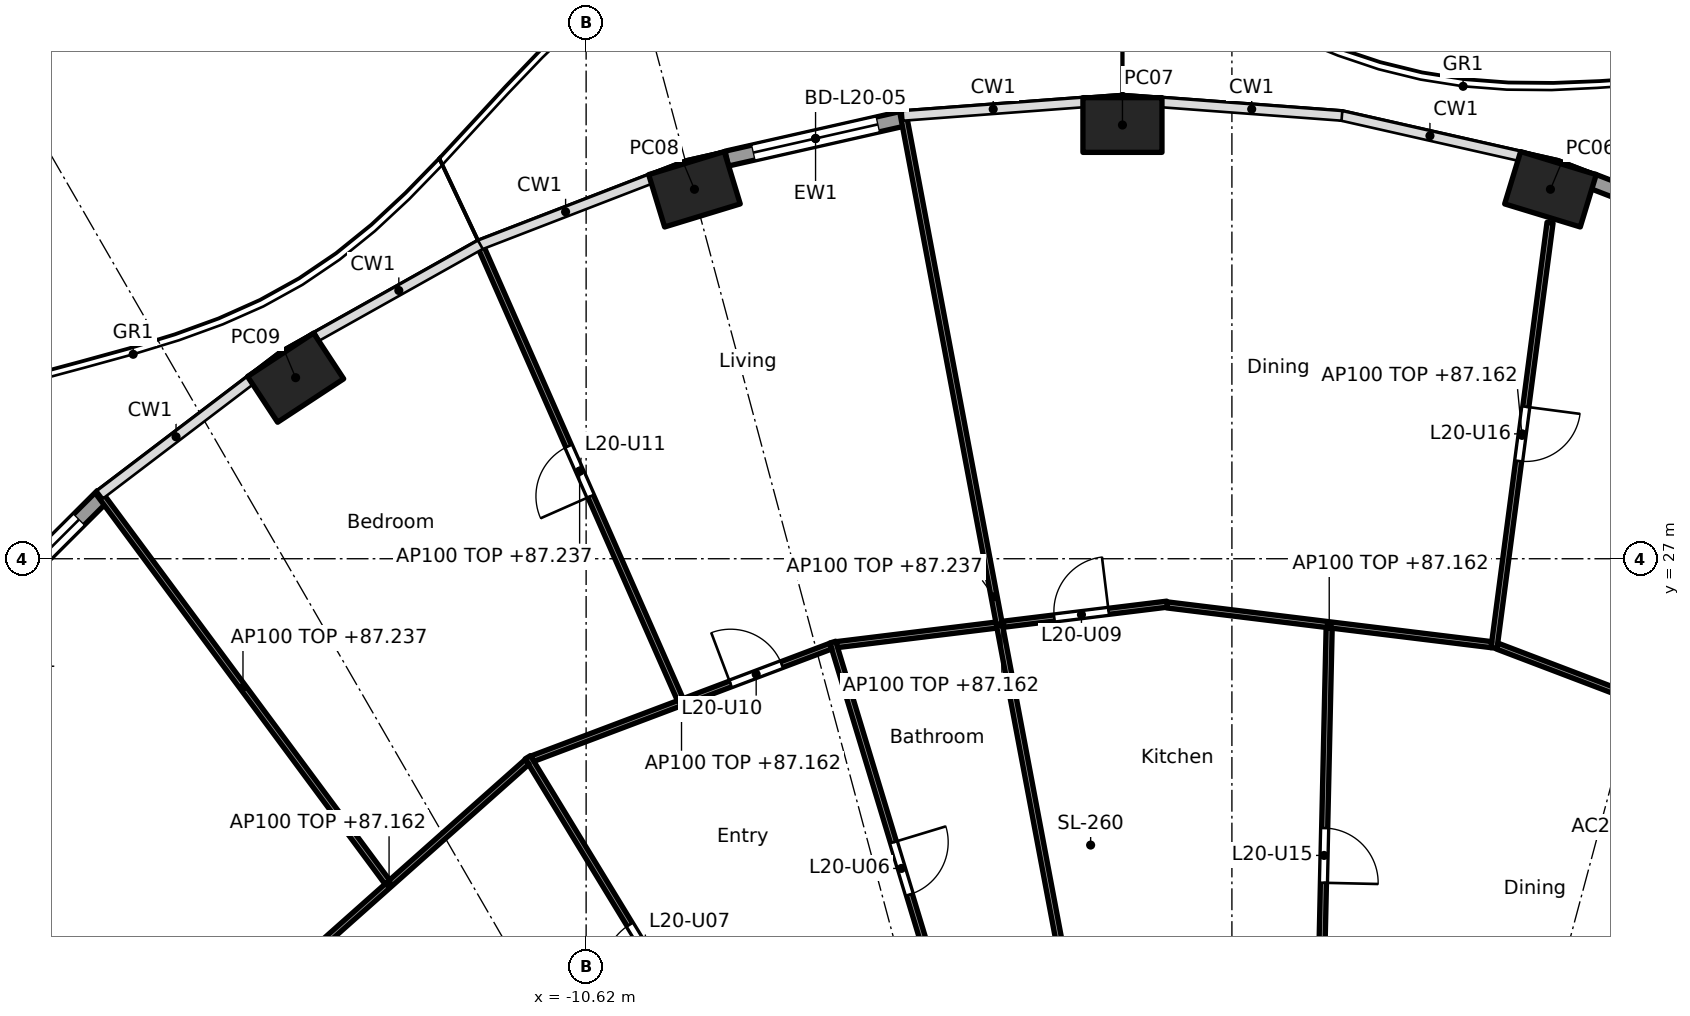
"""IFC4 building model, lengths in metres.
Left out: names, types, materials, properties, quantities, classifications, styles, units other than length and angle.
Written with IfcOpenShell. Run it as: python <this file> out.ifc"""

import sys

from ifc_helpers import new_model, si_unit, direction, frame, frame_2d, origin, origin_2d, place, context, subcontext, project, spatial, rectangle, hollow_rectangle, extrude, element, fill, save


model = new_model("IFC4")
c1 = context("Model", 3, precision=1e-05, world=origin(), true_north=direction((0.0, 1.0)))
c2 = subcontext(c1, "Body", "Model", "MODEL_VIEW")
j1 = project(units=[si_unit("LENGTHUNIT", "METRE"), si_unit("PLANEANGLEUNIT", "RADIAN")], contexts=[c1])
p1 = place(None, origin())
s1 = spatial("IfcSite", under=j1, at=p1, CompositionType="ELEMENT")
p2 = place(p1, origin())
s2 = spatial("IfcBuilding", under=s1, at=p2, CompositionType="ELEMENT")
p3 = place(p2, frame((0.0, 0.0, 84.4)))
s3 = spatial("IfcBuildingStorey", under=s2, at=p3, CompositionType="ELEMENT", Elevation=84.4)
for number, where, z_axis, x_axis in (
    (1, (5.239, 33.076, 0.0), (0.0, 0.0, 1.0), (-0.957, 0.292, 0.0)),
    (2, (-1.8, 34.133, 0.0), (0.0, 0.0, 1.0), (-1.0, 0.0, 0.0)),
    (3, (-8.839, 33.076, 0.0), (0.0, 0.0, 1.0), (-0.957, -0.292, 0.0)),
    (4, (-15.397, 29.978, 0.0), (0.0, 0.0, 1.0), (-0.836, -0.549, 0.0)),
):
    element("IfcColumn", number, at=place(p3, frame(where, z_axis=z_axis, x_axis=x_axis)), inside=s3, PredefinedType="COLUMN", context=c2, shape_type="SweptSolid", body=[
        extrude(hollow_rectangle(XDim=1.3, YDim=0.9, WallThickness=0.045, at=origin_2d()), origin(), (0.0, 0.0, 1.0), 3.7),
    ])
p4 = place(p3, frame((5.929, 33.208, 0.0), z_axis=(0.0, 0.0, 1.0), x_axis=(0.932837560624, -0.360297218263, 0.0)))
e5 = element("IfcWall", 5, at=p4, inside=s3, PredefinedType="SOLIDWALL", context=c2, shape_type="SweptSolid", body=[
    extrude(rectangle(XDim=3.028, YDim=0.25, at=frame_2d((1.514, 0.0))), origin(), (0.0, 0.0, 1.0), 3.44),
])
p5 = place(p4, frame((0.464, 0.0, 0.0)))
e6 = element("IfcOpeningElement", 6, at=p5, cuts=e5, PredefinedType="OPENING", context=c2, shape_type="SweptSolid", body=[
    extrude(rectangle(XDim=2.1, YDim=2.4, at=frame_2d((1.05, 1.2))), frame((0.0, 0.135, 0.0), z_axis=(0.0, -1.0, 0.0), x_axis=(1.0, 0.0, 0.0)), (0.0, 0.0, 1.0), 0.27),
])
p6 = place(p3, frame((-8.306, 33.58, 0.0), z_axis=(0.0, 0.0, 1.0), x_axis=(0.975317607872, 0.220806620767, 0.0)))
e7 = element("IfcWall", 7, at=p6, inside=s3, PredefinedType="SOLIDWALL", context=c2, shape_type="SweptSolid", body=[
    extrude(rectangle(XDim=2.993, YDim=0.25, at=frame_2d((1.497, 0.0))), origin(), (0.0, 0.0, 1.0), 3.44),
])
p7 = place(p6, frame((0.447, 0.0, 0.0)))
e8 = element("IfcOpeningElement", 8, at=p7, cuts=e7, PredefinedType="OPENING", context=c2, shape_type="SweptSolid", body=[
    extrude(rectangle(XDim=2.1, YDim=2.4, at=frame_2d((1.05, 1.2))), frame((0.0, 0.135, 0.0), z_axis=(0.0, -1.0, 0.0), x_axis=(1.0, 0.0, 0.0)), (0.0, 0.0, 1.0), 0.27),
])
p8 = place(p3, frame((-20.835, 25.773, 0.0), z_axis=(0.0, 0.0, 1.0), x_axis=(0.707831646613, 0.706381171927, 0.0)))
e9 = element("IfcWall", 9, at=p8, inside=s3, PredefinedType="SOLIDWALL", context=c2, shape_type="SweptSolid", body=[
    extrude(rectangle(XDim=3.198, YDim=0.25, at=frame_2d((1.599, 0.0))), origin(), (0.0, 0.0, 1.0), 3.44),
])
p9 = place(p8, frame((0.549, 0.0, 0.0)))
e10 = element("IfcOpeningElement", 10, at=p9, cuts=e9, PredefinedType="OPENING", context=c2, shape_type="SweptSolid", body=[
    extrude(rectangle(XDim=2.1, YDim=2.4, at=frame_2d((1.05, 1.2))), frame((0.0, 0.135, 0.0), z_axis=(0.0, -1.0, 0.0), x_axis=(1.0, 0.0, 0.0)), (0.0, 0.0, 1.0), 0.27),
])
p10 = place(p3, frame((6.141, 14.829, 0.0), z_axis=(0.0, 0.0, 1.0), x_axis=(0.354477134193, 0.935064682968, 0.0)))
e11 = element("IfcWall", 11, at=p10, inside=s3, PredefinedType="PARTITIONING", context=c2, shape_type="SweptSolid", body=[
    extrude(rectangle(XDim=15.626, YDim=0.2, at=frame_2d((7.813, 0.0))), origin(), (0.0, 0.0, 1.0), 2.762),
])
p11 = place(p3, frame((9.379, 23.655, 0.0), z_axis=(0.0, 0.0, 1.0), x_axis=(-0.934613076136, 0.355666132653, 0.0)))
e12 = element("IfcWall", 12, at=p11, inside=s3, PredefinedType="PARTITIONING", context=c2, shape_type="SweptSolid", body=[
    extrude(rectangle(XDim=5.366, YDim=0.1, at=frame_2d((2.683, 0.0))), origin(), (0.0, 0.0, 1.0), 2.762),
])
p12 = place(p3, frame((4.311, 25.531, 0.0), z_axis=(0.0, 0.0, 1.0), x_axis=(0.130604008227, 0.991434613595, 0.0)))
e13 = element("IfcWall", 13, at=p12, inside=s3, PredefinedType="PARTITIONING", context=c2, shape_type="SweptSolid", body=[
    extrude(rectangle(XDim=7.055, YDim=0.1, at=frame_2d((3.527, 0.0))), origin(), (0.0, 0.0, 1.0), 2.762),
])
p13 = place(p12, frame((3.102, 0.0, 0.0)))
e14 = element("IfcOpeningElement", 14, at=p13, cuts=e13, PredefinedType="OPENING", context=c2, shape_type="SweptSolid", body=[
    extrude(rectangle(XDim=0.9, YDim=2.1, at=frame_2d((0.45, 1.05))), frame((0.0, 0.06, 0.0), z_axis=(0.0, -1.0, 0.0), x_axis=(1.0, 0.0, 0.0)), (0.0, 0.0, 1.0), 0.12),
])
p14 = place(p3, frame((4.267, 25.587, 0.0), z_axis=(0.0, 0.0, 1.0), x_axis=(-0.992576206119, 0.121624319302, 0.0)))
e15 = element("IfcWall", 15, at=p14, inside=s3, PredefinedType="PARTITIONING", context=c2, shape_type="SweptSolid", body=[
    extrude(rectangle(XDim=5.374, YDim=0.1, at=frame_2d((2.687, 0.0))), origin(), (0.0, 0.0, 1.0), 2.762),
])
p15 = place(p3, frame((1.303, 12.665, 0.0), z_axis=(0.0, 0.0, 1.0), x_axis=(0.022412244057, 0.999748814111, 0.0)))
e16 = element("IfcWall", 16, at=p15, inside=s3, PredefinedType="PARTITIONING", context=c2, shape_type="SweptSolid", body=[
    extrude(rectangle(XDim=13.203, YDim=0.1, at=frame_2d((6.601, 0.0))), origin(), (0.0, 0.0, 1.0), 2.687),
])
p16 = place(p15, frame((2.407, 0.0, 0.0)))
e17 = element("IfcOpeningElement", 17, at=p16, cuts=e16, PredefinedType="OPENING", context=c2, shape_type="SweptSolid", body=[
    extrude(rectangle(XDim=0.9, YDim=2.1, at=frame_2d((0.45, 1.05))), frame((0.0, 0.06, 0.0), z_axis=(0.0, -1.0, 0.0), x_axis=(1.0, 0.0, 0.0)), (0.0, 0.0, 1.0), 0.12),
])
p17 = place(p15, frame((9.009, 0.0, 0.0)))
e18 = element("IfcOpeningElement", 18, at=p17, cuts=e16, PredefinedType="OPENING", context=c2, shape_type="SweptSolid", body=[
    extrude(rectangle(XDim=0.9, YDim=2.1, at=frame_2d((0.45, 1.05))), frame((0.0, 0.06, 0.0), z_axis=(0.0, -1.0, 0.0), x_axis=(1.0, 0.0, 0.0)), (0.0, 0.0, 1.0), 0.12),
])
p18 = place(p3, frame((-1.066, 26.253, 0.0), z_axis=(0.0, 0.0, 1.0), x_axis=(-0.992574853421, -0.121635358166, 0.0)))
e19 = element("IfcWall", 19, at=p18, inside=s3, PredefinedType="PARTITIONING", context=c2, shape_type="SweptSolid", body=[
    extrude(rectangle(XDim=5.473, YDim=0.1, at=frame_2d((2.737, 0.0))), origin(), (0.0, 0.0, 1.0), 2.762),
])
p19 = place(p18, frame((0.969, 0.0, 0.0)))
e20 = element("IfcOpeningElement", 20, at=p19, cuts=e19, PredefinedType="OPENING", context=c2, shape_type="SweptSolid", body=[
    extrude(rectangle(XDim=0.9, YDim=2.1, at=frame_2d((0.45, 1.05))), frame((0.0, 0.06, 0.0), z_axis=(0.0, -1.0, 0.0), x_axis=(1.0, 0.0, 0.0)), (0.0, 0.0, 1.0), 0.12),
])
p20 = place(p3, frame((-2.413, 18.427, 0.0), z_axis=(0.0, 0.0, 1.0), x_axis=(-0.185126823719, 0.982714637695, 0.0)))
e21 = element("IfcWall", 21, at=p20, inside=s3, PredefinedType="PARTITIONING", context=c2, shape_type="SweptSolid", body=[
    extrude(rectangle(XDim=16.176, YDim=0.1, at=frame_2d((8.088, 0.0))), origin(), (0.0, 0.0, 1.0), 2.837),
])
p21 = place(p3, frame((-2.631, 12.66, 0.0), z_axis=(0.0, 0.0, 1.0), x_axis=(-0.290161396499, 0.956977723869, 0.0)))
e22 = element("IfcWall", 22, at=p21, inside=s3, PredefinedType="PARTITIONING", context=c2, shape_type="SweptSolid", body=[
    extrude(rectangle(XDim=13.552, YDim=0.1, at=frame_2d((6.776, 0.0))), origin(), (0.0, 0.0, 1.0), 2.687),
])
p22 = place(p21, frame((0.772, 0.0, 0.0)))
e23 = element("IfcOpeningElement", 23, at=p22, cuts=e22, PredefinedType="OPENING", context=c2, shape_type="SweptSolid", body=[
    extrude(rectangle(XDim=0.9, YDim=2.1, at=frame_2d((0.45, 1.05))), frame((0.0, 0.06, 0.0), z_axis=(0.0, -1.0, 0.0), x_axis=(1.0, 0.0, 0.0)), (0.0, 0.0, 1.0), 0.12),
])
p23 = place(p21, frame((9.212, 0.0, 0.0)))
e24 = element("IfcOpeningElement", 24, at=p23, cuts=e22, PredefinedType="OPENING", context=c2, shape_type="SweptSolid", body=[
    extrude(rectangle(XDim=0.9, YDim=2.1, at=frame_2d((0.45, 1.05))), frame((0.0, 0.06, 0.0), z_axis=(0.0, -1.0, 0.0), x_axis=(1.0, 0.0, 0.0)), (0.0, 0.0, 1.0), 0.12),
])
p24 = place(p3, frame((-6.596, 25.563, 0.0), z_axis=(0.0, 0.0, 1.0), x_axis=(-0.9356162121, -0.353018843201, 0.0)))
e25 = element("IfcWall", 25, at=p24, inside=s3, PredefinedType="PARTITIONING", context=c2, shape_type="SweptSolid", body=[
    extrude(rectangle(XDim=5.249, YDim=0.1, at=frame_2d((2.625, 0.0))), origin(), (0.0, 0.0, 1.0), 2.762),
])
p25 = place(p24, frame((0.862, 0.0, 0.0)))
e26 = element("IfcOpeningElement", 26, at=p25, cuts=e25, PredefinedType="OPENING", context=c2, shape_type="SweptSolid", body=[
    extrude(rectangle(XDim=0.9, YDim=2.1, at=frame_2d((0.45, 1.05))), frame((0.0, 0.06, 0.0), z_axis=(0.0, -1.0, 0.0), x_axis=(1.0, 0.0, 0.0)), (0.0, 0.0, 1.0), 0.12),
])
p26 = place(p3, frame((-9.072, 24.683, 0.0), z_axis=(0.0, 0.0, 1.0), x_axis=(-0.403192911159, 0.915115007194, 0.0)))
e27 = element("IfcWall", 27, at=p26, inside=s3, PredefinedType="PARTITIONING", context=c2, shape_type="SweptSolid", body=[
    extrude(rectangle(XDim=8.211, YDim=0.1, at=frame_2d((4.106, 0.0))), origin(), (0.0, 0.0, 1.0), 2.837),
])
p27 = place(p26, frame((3.656, 0.0, 0.0)))
e28 = element("IfcOpeningElement", 28, at=p27, cuts=e27, PredefinedType="OPENING", context=c2, shape_type="SweptSolid", body=[
    extrude(rectangle(XDim=0.9, YDim=2.1, at=frame_2d((0.45, 1.05))), frame((0.0, 0.06, 0.0), z_axis=(0.0, -1.0, 0.0), x_axis=(1.0, 0.0, 0.0)), (0.0, 0.0, 1.0), 0.12),
])
p28 = place(p3, frame((-6.149, 14.825, 0.0), z_axis=(0.0, 0.0, 1.0), x_axis=(-0.520411490252, 0.853915616917, 0.0)))
e29 = element("IfcWall", 29, at=p28, inside=s3, PredefinedType="PARTITIONING", context=c2, shape_type="SweptSolid", body=[
    extrude(rectangle(XDim=10.435, YDim=0.1, at=frame_2d((5.218, 0.0))), origin(), (0.0, 0.0, 1.0), 3.44),
])
p29 = place(p28, frame((1.582, 0.0, 0.0)))
e30 = element("IfcOpeningElement", 30, at=p29, cuts=e29, PredefinedType="OPENING", context=c2, shape_type="SweptSolid", body=[
    extrude(rectangle(XDim=0.9, YDim=2.1, at=frame_2d((0.45, 1.05))), frame((0.0, 0.06, 0.0), z_axis=(0.0, -1.0, 0.0), x_axis=(1.0, 0.0, 0.0)), (0.0, 0.0, 1.0), 0.12),
])
p30 = place(p28, frame((6.312, 0.0, 0.0)))
e31 = element("IfcOpeningElement", 31, at=p30, cuts=e29, PredefinedType="OPENING", context=c2, shape_type="SweptSolid", body=[
    extrude(rectangle(XDim=0.9, YDim=2.1, at=frame_2d((0.45, 1.05))), frame((0.0, 0.06, 0.0), z_axis=(0.0, -1.0, 0.0), x_axis=(1.0, 0.0, 0.0)), (0.0, 0.0, 1.0), 0.12),
])
p31 = place(p3, frame((-11.591, 23.66, 0.0), z_axis=(0.0, 0.0, 1.0), x_axis=(-0.747429278403, -0.664341383466, 0.0)))
e32 = element("IfcWall", 32, at=p31, inside=s3, PredefinedType="PARTITIONING", context=c2, shape_type="SweptSolid", body=[
    extrude(rectangle(XDim=6.073, YDim=0.1, at=frame_2d((3.037, 0.0))), origin(), (0.0, 0.0, 1.0), 2.762),
])
p32 = place(p3, frame((-13.89, 21.682, 0.0), z_axis=(0.0, 0.0, 1.0), x_axis=(-0.595256113594, 0.803536034804, 0.0)))
e33 = element("IfcWall", 33, at=p32, inside=s3, PredefinedType="PARTITIONING", context=c2, shape_type="SweptSolid", body=[
    extrude(rectangle(XDim=7.972, YDim=0.1, at=frame_2d((3.986, 0.0))), origin(), (0.0, 0.0, 1.0), 2.837),
])
p33 = place(p7, origin())
e34 = element("IfcDoor", 34, at=p33, inside=s3, OperationType="SLIDING_TO_LEFT", PredefinedType="DOOR", context=c2, shape_type="SweptSolid", body=[
    extrude(rectangle(XDim=2.1, YDim=2.4, at=frame_2d((1.05, 1.2))), frame((0.0, 0.025, 0.0), z_axis=(0.0, -1.0, 0.0), x_axis=(1.0, 0.0, 0.0)), (0.0, 0.0, 1.0), 0.05),
])
fill(e8, e34)
p34 = place(p9, origin())
e35 = element("IfcDoor", 35, at=p34, inside=s3, OperationType="SLIDING_TO_LEFT", PredefinedType="DOOR", context=c2, shape_type="SweptSolid", body=[
    extrude(rectangle(XDim=2.1, YDim=2.4, at=frame_2d((1.05, 1.2))), frame((0.0, 0.025, 0.0), z_axis=(0.0, -1.0, 0.0), x_axis=(1.0, 0.0, 0.0)), (0.0, 0.0, 1.0), 0.05),
])
fill(e10, e35)
p35 = place(p23, frame((0.9, 0.0, 0.0), x_axis=(-1.0, 0.0, 0.0)))
e36 = element("IfcDoor", 36, at=p35, inside=s3, OperationType="SINGLE_SWING_LEFT", PredefinedType="DOOR", context=c2, shape_type="SweptSolid", body=[
    extrude(rectangle(XDim=0.9, YDim=2.1, at=frame_2d((0.45, 1.05))), frame((0.0, 0.025, 0.0), z_axis=(0.0, -1.0, 0.0), x_axis=(1.0, 0.0, 0.0)), (0.0, 0.0, 1.0), 0.05),
])
fill(e24, e36)
p36 = place(p30, origin())
e37 = element("IfcDoor", 37, at=p36, inside=s3, OperationType="SINGLE_SWING_LEFT", PredefinedType="DOOR", context=c2, shape_type="SweptSolid", body=[
    extrude(rectangle(XDim=0.9, YDim=2.1, at=frame_2d((0.45, 1.05))), frame((0.0, 0.025, 0.0), z_axis=(0.0, -1.0, 0.0), x_axis=(1.0, 0.0, 0.0)), (0.0, 0.0, 1.0), 0.05),
])
fill(e31, e37)
p37 = place(p19, frame((0.9, 0.0, 0.0), x_axis=(-1.0, 0.0, 0.0)))
e38 = element("IfcDoor", 38, at=p37, inside=s3, OperationType="SINGLE_SWING_RIGHT", PredefinedType="DOOR", context=c2, shape_type="SweptSolid", body=[
    extrude(rectangle(XDim=0.9, YDim=2.1, at=frame_2d((0.45, 1.05))), frame((0.0, 0.025, 0.0), z_axis=(0.0, -1.0, 0.0), x_axis=(1.0, 0.0, 0.0)), (0.0, 0.0, 1.0), 0.05),
])
fill(e20, e38)
p38 = place(p25, frame((0.9, 0.0, 0.0), x_axis=(-1.0, 0.0, 0.0)))
e39 = element("IfcDoor", 39, at=p38, inside=s3, OperationType="SINGLE_SWING_LEFT", PredefinedType="DOOR", context=c2, shape_type="SweptSolid", body=[
    extrude(rectangle(XDim=0.9, YDim=2.1, at=frame_2d((0.45, 1.05))), frame((0.0, 0.025, 0.0), z_axis=(0.0, -1.0, 0.0), x_axis=(1.0, 0.0, 0.0)), (0.0, 0.0, 1.0), 0.05),
])
fill(e26, e39)
p39 = place(p27, origin())
e40 = element("IfcDoor", 40, at=p39, inside=s3, OperationType="SINGLE_SWING_LEFT", PredefinedType="DOOR", context=c2, shape_type="SweptSolid", body=[
    extrude(rectangle(XDim=0.9, YDim=2.1, at=frame_2d((0.45, 1.05))), frame((0.0, 0.025, 0.0), z_axis=(0.0, -1.0, 0.0), x_axis=(1.0, 0.0, 0.0)), (0.0, 0.0, 1.0), 0.05),
])
fill(e28, e40)
p40 = place(p17, frame((0.9, 0.0, 0.0), x_axis=(-1.0, 0.0, 0.0)))
e41 = element("IfcDoor", 41, at=p40, inside=s3, OperationType="SINGLE_SWING_RIGHT", PredefinedType="DOOR", context=c2, shape_type="SweptSolid", body=[
    extrude(rectangle(XDim=0.9, YDim=2.1, at=frame_2d((0.45, 1.05))), frame((0.0, 0.025, 0.0), z_axis=(0.0, -1.0, 0.0), x_axis=(1.0, 0.0, 0.0)), (0.0, 0.0, 1.0), 0.05),
])
fill(e18, e41)
p41 = place(p13, frame((0.9, 0.0, 0.0), x_axis=(-1.0, 0.0, 0.0)))
e42 = element("IfcDoor", 42, at=p41, inside=s3, OperationType="SINGLE_SWING_LEFT", PredefinedType="DOOR", context=c2, shape_type="SweptSolid", body=[
    extrude(rectangle(XDim=0.9, YDim=2.1, at=frame_2d((0.45, 1.05))), frame((0.0, 0.025, 0.0), z_axis=(0.0, -1.0, 0.0), x_axis=(1.0, 0.0, 0.0)), (0.0, 0.0, 1.0), 0.05),
])
fill(e14, e42)
save(model, sys.argv[1])
